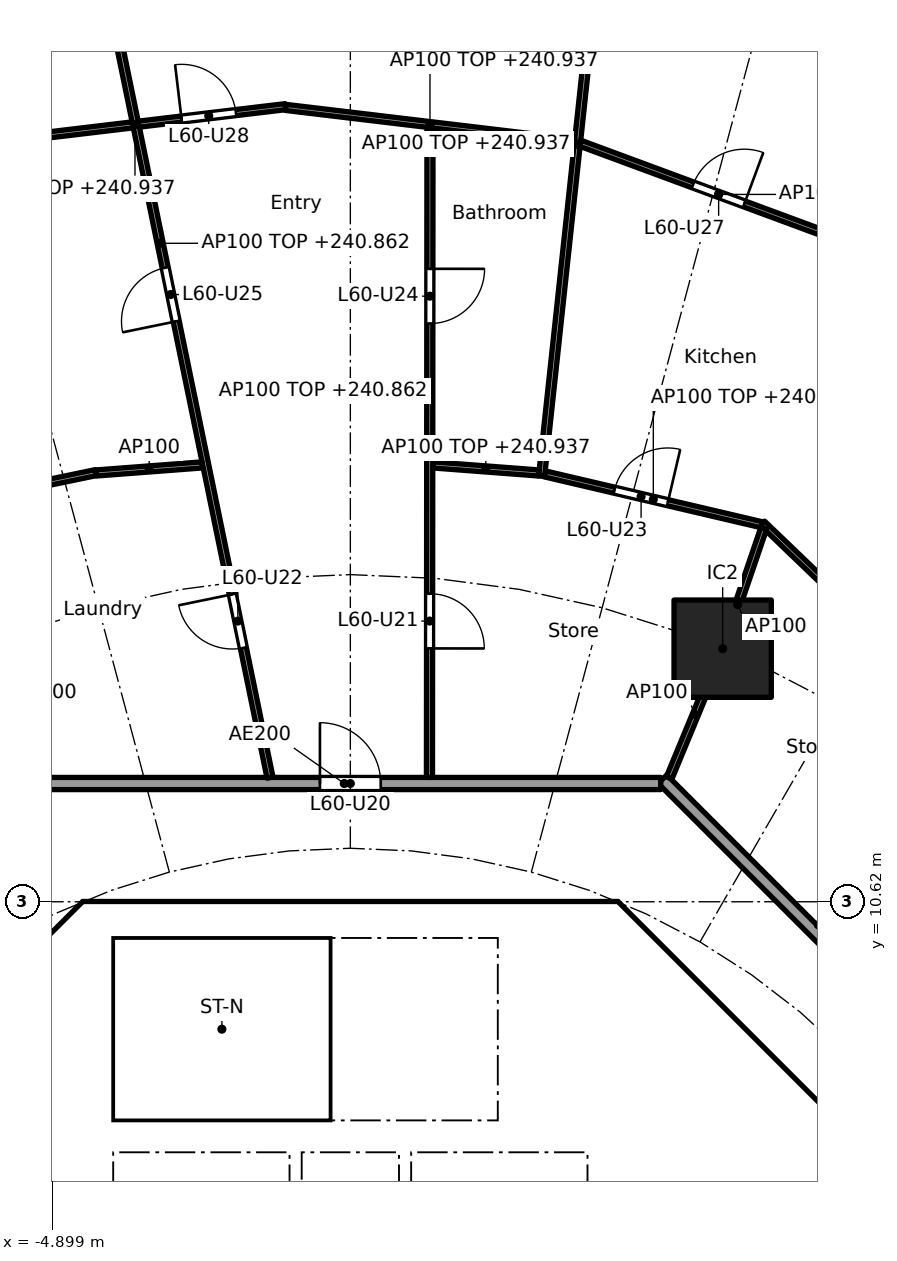
"""IFC4 building model, lengths in metres.
Left out: names, types, materials, properties, quantities, classifications, styles, units other than length and angle.
Written with IfcOpenShell. Run it as: python <this file> out.ifc"""

import sys

from ifc_helpers import new_model, si_unit, direction, frame, frame_2d, origin, origin_2d, place, context, subcontext, project, spatial, polyline, rectangle, outline, extrude, element, fill, save


model = new_model("IFC4")
c1 = context("Model", 3, precision=1e-05, world=origin(), true_north=direction((0.0, 1.0)))
c2 = subcontext(c1, "Body", "Model", "MODEL_VIEW")
j1 = project(units=[si_unit("LENGTHUNIT", "METRE"), si_unit("PLANEANGLEUNIT", "RADIAN")], contexts=[c1])
p1 = place(None, origin())
s1 = spatial("IfcSite", under=j1, at=p1, CompositionType="ELEMENT")
p2 = place(p1, origin())
s2 = spatial("IfcBuilding", under=s1, at=p2, CompositionType="ELEMENT")
p3 = place(p2, frame((0.0, 0.0, 238.1)))
s3 = spatial("IfcBuildingStorey", under=s2, at=p3, CompositionType="ELEMENT", Elevation=238.1)
p4 = place(p3, frame((6.123, 14.782, 0.0), z_axis=(0.0, 0.0, 1.0), x_axis=(1.0, 0.0, 0.0)))
e1 = element("IfcColumn", 1, at=p4, inside=s3, PredefinedType="COLUMN", context=c2, shape_type="SweptSolid", body=[
    extrude(rectangle(XDim=1.6, YDim=1.6, at=origin_2d()), origin(), (0.0, 0.0, 1.0), 3.7),
])
p5 = place(p3, frame((9.988, 4.613, 0.0), z_axis=(0.0, 0.0, 1.0), x_axis=(-0.707106781187, 0.707106781187, 0.0)))
e2 = element("IfcWall", 2, at=p5, inside=s3, PredefinedType="SHEAR", context=c2, shape_type="SweptSolid", body=[
    extrude(rectangle(XDim=7.602, YDim=0.6, at=frame_2d((3.801, 0.0))), origin(), (0.0, 0.0, 1.0), 3.44),
])
p6 = place(p5, frame((3.201, 0.0, 0.0)))
e3 = element("IfcOpeningElement", 3, at=p6, cuts=e2, PredefinedType="OPENING", context=c2, shape_type="SweptSolid", body=[
    extrude(rectangle(XDim=1.2, YDim=2.1, at=frame_2d((0.6, 1.05))), frame((0.0, 0.31, 0.0), z_axis=(0.0, -1.0, 0.0), x_axis=(1.0, 0.0, 0.0)), (0.0, 0.0, 1.0), 0.62),
])
p7 = place(p3, frame((-4.613, 9.988, 0.0), z_axis=(0.0, 0.0, 1.0), x_axis=(-0.707106781187, -0.707106781187, 0.0)))
e4 = element("IfcWall", 4, at=p7, inside=s3, PredefinedType="SHEAR", context=c2, shape_type="SweptSolid", body=[
    extrude(rectangle(XDim=7.602, YDim=0.6, at=frame_2d((3.801, 0.0))), origin(), (0.0, 0.0, 1.0), 3.44),
])
p8 = place(p7, frame((0.351, 0.0, 0.0)))
e5 = element("IfcOpeningElement", 5, at=p8, cuts=e4, PredefinedType="OPENING", context=c2, shape_type="SweptSolid", body=[
    extrude(rectangle(XDim=1.1, YDim=2.1, at=frame_2d((0.55, 1.05))), frame((0.0, 0.31, 0.0), z_axis=(0.0, -1.0, 0.0), x_axis=(1.0, 0.0, 0.0)), (0.0, 0.0, 1.0), 0.62),
])
p9 = place(p3, frame((4.0, 4.3, 0.0), z_axis=(0.0, 0.0, 1.0), x_axis=(0.0, 1.0, 0.0)))
e6 = element("IfcWall", 6, at=p9, inside=s3, PredefinedType="SOLIDWALL", context=c2, shape_type="SweptSolid", body=[
    extrude(rectangle(XDim=2.2, YDim=0.2, at=frame_2d((1.1, 0.0))), origin(), (0.0, 0.0, 1.0), 3.44),
])
p10 = place(p9, frame((0.55, 0.0, 0.0)))
e7 = element("IfcOpeningElement", 7, at=p10, cuts=e6, PredefinedType="OPENING", context=c2, shape_type="SweptSolid", body=[
    extrude(rectangle(XDim=1.1, YDim=2.1, at=frame_2d((0.55, 1.05))), frame((0.0, 0.11, 0.0), z_axis=(0.0, -1.0, 0.0), x_axis=(1.0, 0.0, 0.0)), (0.0, 0.0, 1.0), 0.22),
])
p11 = place(p3, frame((-4.0, 4.3, 0.0), z_axis=(0.0, 0.0, 1.0), x_axis=(0.0, 1.0, 0.0)))
e8 = element("IfcWall", 8, at=p11, inside=s3, PredefinedType="SOLIDWALL", context=c2, shape_type="SweptSolid", body=[
    extrude(rectangle(XDim=2.2, YDim=0.2, at=frame_2d((1.1, 0.0))), origin(), (0.0, 0.0, 1.0), 3.44),
])
p12 = place(p11, frame((0.55, 0.0, 0.0)))
e9 = element("IfcOpeningElement", 9, at=p12, cuts=e8, PredefinedType="OPENING", context=c2, shape_type="SweptSolid", body=[
    extrude(rectangle(XDim=1.1, YDim=2.1, at=frame_2d((0.55, 1.05))), frame((0.0, 0.11, 0.0), z_axis=(0.0, -1.0, 0.0), x_axis=(1.0, 0.0, 0.0)), (0.0, 0.0, 1.0), 0.22),
])
p13 = place(p3, frame((4.0, 7.025, 0.0), z_axis=(0.0, 0.0, 1.0), x_axis=(0.0, 1.0, 0.0)))
e10 = element("IfcWall", 10, at=p13, inside=s3, PredefinedType="SOLIDWALL", context=c2, shape_type="SweptSolid", body=[
    extrude(rectangle(XDim=3.0, YDim=0.2, at=frame_2d((1.5, 0.0))), origin(), (0.0, 0.0, 1.0), 3.44),
])
p14 = place(p13, frame((0.925, 0.0, 0.0)))
e11 = element("IfcOpeningElement", 11, at=p14, cuts=e10, PredefinedType="OPENING", context=c2, shape_type="SweptSolid", body=[
    extrude(rectangle(XDim=1.1, YDim=2.1, at=frame_2d((0.55, 1.05))), frame((0.0, 0.11, 0.0), z_axis=(0.0, -1.0, 0.0), x_axis=(1.0, 0.0, 0.0)), (0.0, 0.0, 1.0), 0.22),
])
p15 = place(p3, origin())
e12 = element("IfcWall", 12, at=p15, inside=s3, PredefinedType="SHEAR", context=c2, shape_type="SweptSolid", body=[
    extrude(outline(polyline([(-4.152, 10.025), (-4.401, 9.776), (-4.825, 10.2), (-4.401, 10.625), (4.401, 10.625), (4.825, 10.2), (4.401, 9.776), (4.152, 10.025), (-4.152, 10.025)])), origin(), (0.0, 0.0, 1.0), 3.44),
])
for number, where, z_axis, x_axis in (
    (13, (-0.9, 4.3, 0.0), (0.0, 0.0, 1.0), (0.0, 1.0, 0.0)),
    (14, (0.9, 4.3, 0.0), (0.0, 0.0, 1.0), (0.0, 1.0, 0.0)),
):
    element("IfcWall", number, at=place(p3, frame(where, z_axis=z_axis, x_axis=x_axis)), inside=s3, PredefinedType="SOLIDWALL", context=c2, shape_type="SweptSolid", body=[
        extrude(rectangle(XDim=2.2, YDim=0.2, at=frame_2d((1.1, 0.0))), origin(), (0.0, 0.0, 1.0), 3.44),
    ])
p16 = place(p3, origin())
e15 = element("IfcWall", 15, at=p16, inside=s3, PredefinedType="SOLIDWALL", context=c2, shape_type="SweptSolid", body=[
    extrude(outline(polyline([(-3.9, 7.025), (-4.1, 7.025), (-4.1, 10.025), (-3.9, 10.025), (-3.9, 7.025)])), origin(), (0.0, 0.0, 1.0), 3.44),
])
p17 = place(p3, origin())
e16 = element("IfcWall", 16, at=p17, inside=s3, PredefinedType="SOLIDWALL", context=c2, shape_type="SweptSolid", body=[
    extrude(outline(polyline([(4.1, 6.5), (-4.1, 6.5), (-4.1, 7.025), (4.1, 7.025), (4.1, 6.5)])), origin(), (0.0, 0.0, 1.0), 3.44),
])
p18 = place(p3, frame((12.635, 5.134, 0.0), z_axis=(0.0, 0.0, 1.0), x_axis=(-0.707106781187, 0.707106781187, 0.0)))
e17 = element("IfcWall", 17, at=p18, inside=s3, PredefinedType="PARTITIONING", context=c2, shape_type="SweptSolid", body=[
    extrude(rectangle(XDim=10.609, YDim=0.2, at=frame_2d((5.305, 0.0))), origin(), (0.0, 0.0, 1.0), 3.44),
])
p19 = place(p3, frame((5.104, 12.565, 0.0), z_axis=(0.0, 0.0, 1.0), x_axis=(-1.0, 0.0, 0.0)))
e18 = element("IfcWall", 18, at=p19, inside=s3, PredefinedType="PARTITIONING", context=c2, shape_type="SweptSolid", body=[
    extrude(rectangle(XDim=10.409, YDim=0.2, at=frame_2d((5.205, 0.0))), origin(), (0.0, 0.0, 1.0), 3.44),
])
p20 = place(p19, frame((4.604, 0.0, 0.0)))
e19 = element("IfcOpeningElement", 19, at=p20, cuts=e18, PredefinedType="OPENING", context=c2, shape_type="SweptSolid", body=[
    extrude(rectangle(XDim=1.0, YDim=2.1, at=frame_2d((0.5, 1.05))), frame((0.0, 0.11, 0.0), z_axis=(0.0, -1.0, 0.0), x_axis=(1.0, 0.0, 0.0)), (0.0, 0.0, 1.0), 0.22),
])
p21 = place(p3, frame((7.71, 10.197, 0.0), z_axis=(0.0, 0.0, 1.0), x_axis=(0.521477621335, 0.853264959111, 0.0)))
e20 = element("IfcWall", 20, at=p21, inside=s3, PredefinedType="PARTITIONING", context=c2, shape_type="SweptSolid", body=[
    extrude(rectangle(XDim=8.941, YDim=0.1, at=frame_2d((4.471, 0.0))), origin(), (0.0, 0.0, 1.0), 2.762),
])
p22 = place(p21, frame((6.121, 0.0, 0.0)))
e21 = element("IfcOpeningElement", 21, at=p22, cuts=e20, PredefinedType="OPENING", context=c2, shape_type="SweptSolid", body=[
    extrude(rectangle(XDim=0.9, YDim=2.1, at=frame_2d((0.45, 1.05))), frame((0.0, 0.06, 0.0), z_axis=(0.0, -1.0, 0.0), x_axis=(1.0, 0.0, 0.0)), (0.0, 0.0, 1.0), 0.12),
])
p23 = place(p3, frame((9.89, 13.858, 0.0), z_axis=(0.0, 0.0, 1.0), x_axis=(-0.72167233993, 0.692234811159, 0.0)))
e22 = element("IfcWall", 22, at=p23, inside=s3, PredefinedType="PARTITIONING", context=c2, shape_type="SweptSolid", body=[
    extrude(rectangle(XDim=4.313, YDim=0.1, at=frame_2d((2.156, 0.0))), origin(), (0.0, 0.0, 1.0), 2.837),
])
p24 = place(p23, frame((0.883, 0.0, 0.0)))
e23 = element("IfcOpeningElement", 23, at=p24, cuts=e22, PredefinedType="OPENING", context=c2, shape_type="SweptSolid", body=[
    extrude(rectangle(XDim=0.9, YDim=2.1, at=frame_2d((0.45, 1.05))), frame((0.0, 0.06, 0.0), z_axis=(0.0, -1.0, 0.0), x_axis=(1.0, 0.0, 0.0)), (0.0, 0.0, 1.0), 0.12),
])
p25 = place(p3, frame((5.243, 12.657, 0.0), z_axis=(0.0, 0.0, 1.0), x_axis=(0.382719158442, 0.923864733477, 0.0)))
e24 = element("IfcWall", 24, at=p25, inside=s3, PredefinedType="PARTITIONING", context=c2, shape_type="SweptSolid", body=[
    extrude(rectangle(XDim=2.25, YDim=0.1, at=frame_2d((1.125, 0.0))), origin(), (0.0, 0.0, 1.0), 3.44),
])
p26 = place(p3, frame((6.139, 14.829, 0.0), z_axis=(0.0, 0.0, 1.0), x_axis=(0.32278593828, 0.946471995385, 0.0)))
e25 = element("IfcWall", 25, at=p26, inside=s3, PredefinedType="PARTITIONING", context=c2, shape_type="SweptSolid", body=[
    extrude(rectangle(XDim=2.042, YDim=0.1, at=frame_2d((1.021, 0.0))), origin(), (0.0, 0.0, 1.0), 3.44),
])
p27 = place(p3, frame((6.766, 16.82, 0.0), z_axis=(0.0, 0.0, 1.0), x_axis=(-0.973612608559, 0.22820711745, 0.0)))
e26 = element("IfcWall", 26, at=p27, inside=s3, PredefinedType="PARTITIONING", context=c2, shape_type="SweptSolid", body=[
    extrude(rectangle(XDim=3.663, YDim=0.1, at=frame_2d((1.832, 0.0))), origin(), (0.0, 0.0, 1.0), 2.837),
])
p28 = place(p27, frame((1.588, 0.0, 0.0)))
e27 = element("IfcOpeningElement", 27, at=p28, cuts=e26, PredefinedType="OPENING", context=c2, shape_type="SweptSolid", body=[
    extrude(rectangle(XDim=0.9, YDim=2.1, at=frame_2d((0.45, 1.05))), frame((0.0, 0.06, 0.0), z_axis=(0.0, -1.0, 0.0), x_axis=(1.0, 0.0, 0.0)), (0.0, 0.0, 1.0), 0.12),
])
p29 = place(p3, frame((8.331, 21.411, 0.0), z_axis=(0.0, 0.0, 1.0), x_axis=(-0.937891982431, 0.346927412136, 0.0)))
e28 = element("IfcWall", 28, at=p29, inside=s3, PredefinedType="PARTITIONING", context=c2, shape_type="SweptSolid", body=[
    extrude(rectangle(XDim=4.85, YDim=0.1, at=frame_2d((2.425, 0.0))), origin(), (0.0, 0.0, 1.0), 2.837),
])
p30 = place(p29, frame((1.975, 0.0, 0.0)))
e29 = element("IfcOpeningElement", 29, at=p30, cuts=e28, PredefinedType="OPENING", context=c2, shape_type="SweptSolid", body=[
    extrude(rectangle(XDim=0.9, YDim=2.1, at=frame_2d((0.45, 1.05))), frame((0.0, 0.06, 0.0), z_axis=(0.0, -1.0, 0.0), x_axis=(1.0, 0.0, 0.0)), (0.0, 0.0, 1.0), 0.12),
])
p31 = place(p3, frame((3.145, 17.618, 0.0), z_axis=(0.0, 0.0, 1.0), x_axis=(0.106818720076, 0.994278512813, 0.0)))
e30 = element("IfcWall", 30, at=p31, inside=s3, PredefinedType="PARTITIONING", context=c2, shape_type="SweptSolid", body=[
    extrude(rectangle(XDim=10.987, YDim=0.1, at=frame_2d((5.493, 0.0))), origin(), (0.0, 0.0, 1.0), 2.837),
])
p32 = place(p3, frame((3.101, 17.671, 0.0), z_axis=(0.0, 0.0, 1.0), x_axis=(-0.997127864669, 0.075736526859, 0.0)))
e31 = element("IfcWall", 31, at=p32, inside=s3, PredefinedType="PARTITIONING", context=c2, shape_type="SweptSolid", body=[
    extrude(rectangle(XDim=1.75, YDim=0.1, at=frame_2d((0.875, 0.0))), origin(), (0.0, 0.0, 1.0), 2.837),
])
p33 = place(p3, frame((3.686, 23.117, 0.0), z_axis=(0.0, 0.0, 1.0), x_axis=(-0.992965872314, 0.11840091393, 0.0)))
e32 = element("IfcWall", 32, at=p33, inside=s3, PredefinedType="PARTITIONING", context=c2, shape_type="SweptSolid", body=[
    extrude(rectangle(XDim=4.786, YDim=0.1, at=frame_2d((2.393, 0.0))), origin(), (0.0, 0.0, 1.0), 2.837),
])
p34 = place(p3, frame((1.301, 12.665, 0.0), z_axis=(0.0, 0.0, 1.0), x_axis=(0.000776840765, 0.999999698259, 0.0)))
e33 = element("IfcWall", 33, at=p34, inside=s3, PredefinedType="PARTITIONING", context=c2, shape_type="SweptSolid", body=[
    extrude(rectangle(XDim=10.685, YDim=0.1, at=frame_2d((5.343, 0.0))), origin(), (0.0, 0.0, 1.0), 2.762),
])
p35 = place(p34, frame((2.121, 0.0, 0.0)))
e34 = element("IfcOpeningElement", 34, at=p35, cuts=e33, PredefinedType="OPENING", context=c2, shape_type="SweptSolid", body=[
    extrude(rectangle(XDim=0.9, YDim=2.1, at=frame_2d((0.45, 1.05))), frame((0.0, 0.06, 0.0), z_axis=(0.0, -1.0, 0.0), x_axis=(1.0, 0.0, 0.0)), (0.0, 0.0, 1.0), 0.12),
])
p36 = place(p34, frame((7.464, 0.0, 0.0)))
e35 = element("IfcOpeningElement", 35, at=p36, cuts=e33, PredefinedType="OPENING", context=c2, shape_type="SweptSolid", body=[
    extrude(rectangle(XDim=0.9, YDim=2.1, at=frame_2d((0.45, 1.05))), frame((0.0, 0.06, 0.0), z_axis=(0.0, -1.0, 0.0), x_axis=(1.0, 0.0, 0.0)), (0.0, 0.0, 1.0), 0.12),
])
p37 = place(p3, frame((-1.066, 23.695, 0.0), z_axis=(0.0, 0.0, 1.0), x_axis=(-0.992959092097, -0.118457762183, 0.0)))
e36 = element("IfcWall", 36, at=p37, inside=s3, PredefinedType="PARTITIONING", context=c2, shape_type="SweptSolid", body=[
    extrude(rectangle(XDim=4.986, YDim=0.1, at=frame_2d((2.493, 0.0))), origin(), (0.0, 0.0, 1.0), 2.837),
])
p38 = place(p37, frame((0.821, 0.0, 0.0)))
e37 = element("IfcOpeningElement", 37, at=p38, cuts=e36, PredefinedType="OPENING", context=c2, shape_type="SweptSolid", body=[
    extrude(rectangle(XDim=0.9, YDim=2.1, at=frame_2d((0.45, 1.05))), frame((0.0, 0.06, 0.0), z_axis=(0.0, -1.0, 0.0), x_axis=(1.0, 0.0, 0.0)), (0.0, 0.0, 1.0), 0.12),
])
p39 = place(p3, frame((-1.321, 12.663, 0.0), z_axis=(0.0, 0.0, 1.0), x_axis=(-0.201366062305, 0.979516058547, 0.0)))
e38 = element("IfcWall", 38, at=p39, inside=s3, PredefinedType="PARTITIONING", context=c2, shape_type="SweptSolid", body=[
    extrude(rectangle(XDim=17.939, YDim=0.1, at=frame_2d((8.969, 0.0))), origin(), (0.0, 0.0, 1.0), 2.762),
])
p40 = place(p39, frame((2.177, 0.0, 0.0)))
e39 = element("IfcOpeningElement", 39, at=p40, cuts=e38, PredefinedType="OPENING", context=c2, shape_type="SweptSolid", body=[
    extrude(rectangle(XDim=0.9, YDim=2.1, at=frame_2d((0.45, 1.05))), frame((0.0, 0.06, 0.0), z_axis=(0.0, -1.0, 0.0), x_axis=(1.0, 0.0, 0.0)), (0.0, 0.0, 1.0), 0.12),
])
p41 = place(p39, frame((7.659, 0.0, 0.0)))
e40 = element("IfcOpeningElement", 40, at=p41, cuts=e38, PredefinedType="OPENING", context=c2, shape_type="SweptSolid", body=[
    extrude(rectangle(XDim=0.9, YDim=2.1, at=frame_2d((0.45, 1.05))), frame((0.0, 0.06, 0.0), z_axis=(0.0, -1.0, 0.0), x_axis=(1.0, 0.0, 0.0)), (0.0, 0.0, 1.0), 0.12),
])
p42 = place(p39, frame((14.002, 0.0, 0.0)))
e41 = element("IfcOpeningElement", 41, at=p42, cuts=e38, PredefinedType="OPENING", context=c2, shape_type="SweptSolid", body=[
    extrude(rectangle(XDim=0.9, YDim=2.1, at=frame_2d((0.45, 1.05))), frame((0.0, 0.06, 0.0), z_axis=(0.0, -1.0, 0.0), x_axis=(1.0, 0.0, 0.0)), (0.0, 0.0, 1.0), 0.12),
])
p43 = place(p3, frame((-2.435, 17.804, 0.0), z_axis=(0.0, 0.0, 1.0), x_axis=(-0.997128664551, -0.075725995084, 0.0)))
e42 = element("IfcWall", 42, at=p43, inside=s3, PredefinedType="PARTITIONING", context=c2, shape_type="SweptSolid", body=[
    extrude(rectangle(XDim=1.751, YDim=0.1, at=frame_2d((0.875, 0.0))), origin(), (0.0, 0.0, 1.0), 3.44),
])
p44 = place(p3, frame((-4.182, 17.678, 0.0), z_axis=(0.0, 0.0, 1.0), x_axis=(-0.979196996208, -0.202911908517, 0.0)))
e43 = element("IfcWall", 43, at=p44, inside=s3, PredefinedType="PARTITIONING", context=c2, shape_type="SweptSolid", body=[
    extrude(rectangle(XDim=3.321, YDim=0.1, at=frame_2d((1.66, 0.0))), origin(), (0.0, 0.0, 1.0), 2.837),
])
p45 = place(p14, origin())
e44 = element("IfcDoor", 44, at=p45, inside=s3, OperationType="SINGLE_SWING_LEFT", PredefinedType="DOOR", context=c2, shape_type="SweptSolid", body=[
    extrude(rectangle(XDim=1.1, YDim=2.1, at=frame_2d((0.55, 1.05))), frame((0.0, 0.025, 0.0), z_axis=(0.0, -1.0, 0.0), x_axis=(1.0, 0.0, 0.0)), (0.0, 0.0, 1.0), 0.05),
])
fill(e11, e44)
p46 = place(p6, origin())
e45 = element("IfcDoor", 45, at=p46, inside=s3, OperationType="SINGLE_SWING_LEFT", PredefinedType="DOOR", context=c2, shape_type="SweptSolid", body=[
    extrude(rectangle(XDim=1.2, YDim=2.1, at=frame_2d((0.6, 1.05))), frame((0.0, 0.025, 0.0), z_axis=(0.0, -1.0, 0.0), x_axis=(1.0, 0.0, 0.0)), (0.0, 0.0, 1.0), 0.05),
])
fill(e3, e45)
p47 = place(p8, origin())
e46 = element("IfcDoor", 46, at=p47, inside=s3, OperationType="SINGLE_SWING_LEFT", PredefinedType="DOOR", context=c2, shape_type="SweptSolid", body=[
    extrude(rectangle(XDim=1.1, YDim=2.1, at=frame_2d((0.55, 1.05))), frame((0.0, 0.025, 0.0), z_axis=(0.0, -1.0, 0.0), x_axis=(1.0, 0.0, 0.0)), (0.0, 0.0, 1.0), 0.05),
])
fill(e5, e46)
p48 = place(p20, frame((1.0, 0.0, 0.0), x_axis=(-1.0, 0.0, 0.0)))
e47 = element("IfcDoor", 47, at=p48, inside=s3, OperationType="SINGLE_SWING_LEFT", PredefinedType="DOOR", context=c2, shape_type="SweptSolid", body=[
    extrude(rectangle(XDim=1.0, YDim=2.1, at=frame_2d((0.5, 1.05))), frame((0.0, 0.025, 0.0), z_axis=(0.0, -1.0, 0.0), x_axis=(1.0, 0.0, 0.0)), (0.0, 0.0, 1.0), 0.05),
])
fill(e19, e47)
p49 = place(p35, frame((0.9, 0.0, 0.0), x_axis=(-1.0, 0.0, 0.0)))
e48 = element("IfcDoor", 48, at=p49, inside=s3, OperationType="SINGLE_SWING_RIGHT", PredefinedType="DOOR", context=c2, shape_type="SweptSolid", body=[
    extrude(rectangle(XDim=0.9, YDim=2.1, at=frame_2d((0.45, 1.05))), frame((0.0, 0.025, 0.0), z_axis=(0.0, -1.0, 0.0), x_axis=(1.0, 0.0, 0.0)), (0.0, 0.0, 1.0), 0.05),
])
fill(e34, e48)
p50 = place(p40, origin())
e49 = element("IfcDoor", 49, at=p50, inside=s3, OperationType="SINGLE_SWING_RIGHT", PredefinedType="DOOR", context=c2, shape_type="SweptSolid", body=[
    extrude(rectangle(XDim=0.9, YDim=2.1, at=frame_2d((0.45, 1.05))), frame((0.0, 0.025, 0.0), z_axis=(0.0, -1.0, 0.0), x_axis=(1.0, 0.0, 0.0)), (0.0, 0.0, 1.0), 0.05),
])
fill(e39, e49)
p51 = place(p28, frame((0.9, 0.0, 0.0), x_axis=(-1.0, 0.0, 0.0)))
e50 = element("IfcDoor", 50, at=p51, inside=s3, OperationType="SINGLE_SWING_RIGHT", PredefinedType="DOOR", context=c2, shape_type="SweptSolid", body=[
    extrude(rectangle(XDim=0.9, YDim=2.1, at=frame_2d((0.45, 1.05))), frame((0.0, 0.025, 0.0), z_axis=(0.0, -1.0, 0.0), x_axis=(1.0, 0.0, 0.0)), (0.0, 0.0, 1.0), 0.05),
])
fill(e27, e50)
p52 = place(p36, frame((0.9, 0.0, 0.0), x_axis=(-1.0, 0.0, 0.0)))
e51 = element("IfcDoor", 51, at=p52, inside=s3, OperationType="SINGLE_SWING_LEFT", PredefinedType="DOOR", context=c2, shape_type="SweptSolid", body=[
    extrude(rectangle(XDim=0.9, YDim=2.1, at=frame_2d((0.45, 1.05))), frame((0.0, 0.025, 0.0), z_axis=(0.0, -1.0, 0.0), x_axis=(1.0, 0.0, 0.0)), (0.0, 0.0, 1.0), 0.05),
])
fill(e35, e51)
p53 = place(p41, origin())
e52 = element("IfcDoor", 52, at=p53, inside=s3, OperationType="SINGLE_SWING_LEFT", PredefinedType="DOOR", context=c2, shape_type="SweptSolid", body=[
    extrude(rectangle(XDim=0.9, YDim=2.1, at=frame_2d((0.45, 1.05))), frame((0.0, 0.025, 0.0), z_axis=(0.0, -1.0, 0.0), x_axis=(1.0, 0.0, 0.0)), (0.0, 0.0, 1.0), 0.05),
])
fill(e40, e52)
p54 = place(p30, frame((0.9, 0.0, 0.0), x_axis=(-1.0, 0.0, 0.0)))
e53 = element("IfcDoor", 53, at=p54, inside=s3, OperationType="SINGLE_SWING_RIGHT", PredefinedType="DOOR", context=c2, shape_type="SweptSolid", body=[
    extrude(rectangle(XDim=0.9, YDim=2.1, at=frame_2d((0.45, 1.05))), frame((0.0, 0.025, 0.0), z_axis=(0.0, -1.0, 0.0), x_axis=(1.0, 0.0, 0.0)), (0.0, 0.0, 1.0), 0.05),
])
fill(e29, e53)
p55 = place(p38, frame((0.9, 0.0, 0.0), x_axis=(-1.0, 0.0, 0.0)))
e54 = element("IfcDoor", 54, at=p55, inside=s3, OperationType="SINGLE_SWING_LEFT", PredefinedType="DOOR", context=c2, shape_type="SweptSolid", body=[
    extrude(rectangle(XDim=0.9, YDim=2.1, at=frame_2d((0.45, 1.05))), frame((0.0, 0.025, 0.0), z_axis=(0.0, -1.0, 0.0), x_axis=(1.0, 0.0, 0.0)), (0.0, 0.0, 1.0), 0.05),
])
fill(e37, e54)
save(model, sys.argv[1])
